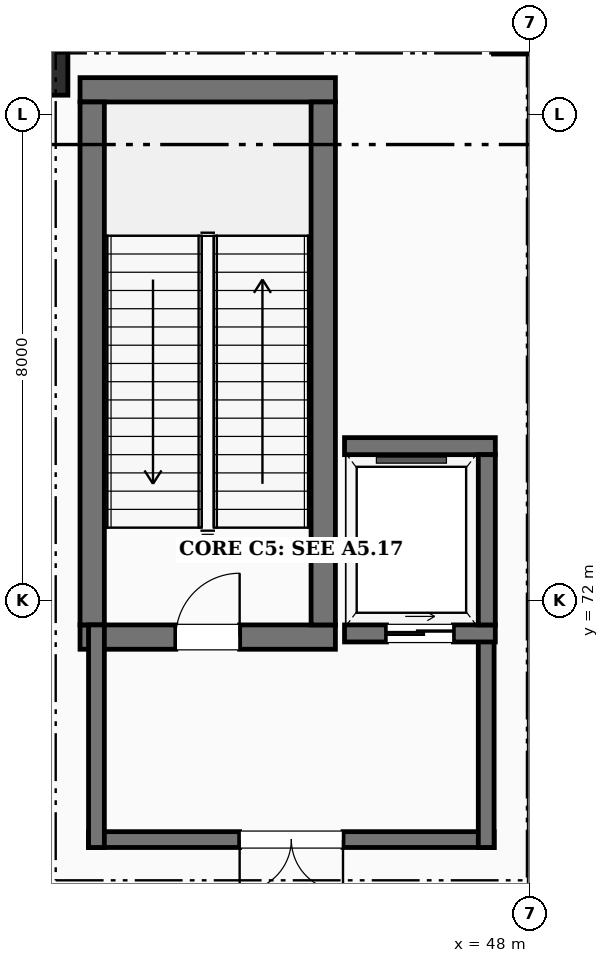
"""IFC4 building model, lengths in metres.
Left out: names, types, materials, properties, quantities, classifications, styles, units other than length and angle.
Written with IfcOpenShell. Run it as: python <this file> out.ifc"""

import sys

from ifc_helpers import new_model, si_unit, direction, frame, frame_2d, origin, origin_2d, place, context, subcontext, project, spatial, rectangle, extrude, element, fill, save


model = new_model("IFC4")
c1 = context("Model", 3, precision=1e-05, world=origin(), true_north=direction((0.0, 1.0)))
c2 = subcontext(c1, "Body", "Model", "MODEL_VIEW")
j1 = project(units=[si_unit("LENGTHUNIT", "METRE"), si_unit("PLANEANGLEUNIT", "RADIAN")], contexts=[c1])
p1 = place(None, origin())
s1 = spatial("IfcSite", under=j1, at=p1, CompositionType="ELEMENT")
p2 = place(p1, origin())
s2 = spatial("IfcBuilding", under=s1, at=p2, CompositionType="ELEMENT")
p3 = place(p2, origin())
s3 = spatial("IfcBuildingStorey", under=s2, at=p3, CompositionType="ELEMENT", Elevation=0.0)
p4 = place(p3, frame((40.0, 80.712, 0.0), z_axis=(0.0, 0.0, 1.0), x_axis=(1.0, 0.0, 0.0)))
e1 = element("IfcColumn", 1, at=p4, inside=s3, PredefinedType="COLUMN", context=c2, shape_type="SweptSolid", body=[
    extrude(rectangle(XDim=0.8, YDim=0.8, at=origin_2d()), origin(), (0.0, 0.0, 1.0), 5.4),
])
p5 = place(p3, frame((48.0, 81.388, 0.0), z_axis=(0.0, 0.0, 1.0), x_axis=(1.0, 0.0, 0.0)))
e2 = element("IfcColumn", 2, at=p5, inside=s3, PredefinedType="COLUMN", context=c2, shape_type="SweptSolid", body=[
    extrude(rectangle(XDim=1.2, YDim=0.8, at=origin_2d()), origin(), (0.0, 0.0, 1.0), 5.4),
])
p6 = place(p3, frame((40.6, 71.4, 0.0), z_axis=(0.0, 0.0, 1.0), x_axis=(1.0, 0.0, 0.0)))
e3 = element("IfcWall", 3, at=p6, inside=s3, PredefinedType="SHEAR", context=c2, shape_type="SweptSolid", body=[
    extrude(rectangle(XDim=4.2, YDim=0.4, at=frame_2d((2.1, 0.0))), origin(), (0.0, 0.0, 1.0), 5.4),
])
p7 = place(p6, frame((1.575, 0.0, 0.0)))
e4 = element("IfcOpeningElement", 4, at=p7, cuts=e3, PredefinedType="OPENING", context=c2, shape_type="SweptSolid", body=[
    extrude(rectangle(XDim=1.05, YDim=2.15, at=frame_2d((0.525, 1.075))), frame((0.0, 0.21, 0.0), z_axis=(0.0, -1.0, 0.0), x_axis=(1.0, 0.0, 0.0)), (0.0, 0.0, 1.0), 0.42),
])
p8 = place(p3, frame((40.6, 80.4, 0.0), z_axis=(0.0, 0.0, 1.0), x_axis=(1.0, 0.0, 0.0)))
e5 = element("IfcWall", 5, at=p8, inside=s3, PredefinedType="SHEAR", context=c2, shape_type="SweptSolid", body=[
    extrude(rectangle(XDim=4.2, YDim=0.4, at=frame_2d((2.1, 0.0))), origin(), (0.0, 0.0, 1.0), 5.4),
])
for number, where, z_axis, x_axis in (
    (6, (40.8, 71.6, 0.0), (0.0, 0.0, 1.0), (0.0, 1.0, 0.0)),
    (7, (44.6, 71.6, 0.0), (0.0, 0.0, 1.0), (0.0, 1.0, 0.0)),
):
    element("IfcWall", number, at=place(p3, frame(where, z_axis=z_axis, x_axis=x_axis)), inside=s3, PredefinedType="SHEAR", context=c2, shape_type="SweptSolid", body=[
        extrude(rectangle(XDim=8.6, YDim=0.4, at=frame_2d((4.3, 0.0))), origin(), (0.0, 0.0, 1.0), 5.4),
    ])
p9 = place(p3, frame((47.41, 68.07, 0.0), z_axis=(0.0, 0.0, 1.0), x_axis=(-1.0, 0.0, 0.0)))
e8 = element("IfcWall", 8, at=p9, inside=s3, PredefinedType="SHEAR", context=c2, shape_type="SweptSolid", body=[
    extrude(rectangle(XDim=6.67, YDim=0.26, at=frame_2d((3.335, 0.0))), origin(), (0.0, 0.0, 1.0), 5.4),
])
p10 = place(p9, frame((2.485, 0.0, 0.0)))
e9 = element("IfcOpeningElement", 9, at=p10, cuts=e8, PredefinedType="OPENING", context=c2, shape_type="SweptSolid", body=[
    extrude(rectangle(XDim=1.7, YDim=2.2, at=frame_2d((0.85, 1.1))), frame((0.0, 0.14, 0.0), z_axis=(0.0, -1.0, 0.0), x_axis=(1.0, 0.0, 0.0)), (0.0, 0.0, 1.0), 0.28),
])
for number, where, z_axis, x_axis in (
    (10, (40.87, 67.94, 0.0), (0.0, 0.0, 1.0), (0.0, 1.0, 0.0)),
    (11, (47.28, 67.94, 0.0), (0.0, 0.0, 1.0), (0.0, 1.0, 0.0)),
):
    element("IfcWall", number, at=place(p3, frame(where, z_axis=z_axis, x_axis=x_axis)), inside=s3, PredefinedType="SHEAR", context=c2, shape_type="SweptSolid", body=[
        extrude(rectangle(XDim=3.66, YDim=0.26, at=frame_2d((1.83, 0.0))), origin(), (0.0, 0.0, 1.0), 5.4),
    ])
p11 = place(p3, frame((44.95, 71.46, 0.0), z_axis=(0.0, 0.0, 1.0), x_axis=(1.0, 0.0, 0.0)))
e12 = element("IfcWall", 12, at=p11, inside=s3, PredefinedType="SHEAR", context=c2, shape_type="SweptSolid", body=[
    extrude(rectangle(XDim=2.48, YDim=0.28, at=frame_2d((1.24, 0.0))), origin(), (0.0, 0.0, 1.0), 5.4),
])
p12 = place(p11, frame((0.69, 0.0, 0.0)))
e13 = element("IfcOpeningElement", 13, at=p12, cuts=e12, PredefinedType="OPENING", context=c2, shape_type="SweptSolid", body=[
    extrude(rectangle(XDim=1.1, YDim=2.15, at=frame_2d((0.55, 1.075))), frame((0.0, 0.15, 0.0), z_axis=(0.0, -1.0, 0.0), x_axis=(1.0, 0.0, 0.0)), (0.0, 0.0, 1.0), 0.3),
])
p13 = place(p3, frame((44.95, 74.54, 0.0), z_axis=(0.0, 0.0, 1.0), x_axis=(1.0, 0.0, 0.0)))
e14 = element("IfcWall", 14, at=p13, inside=s3, PredefinedType="SHEAR", context=c2, shape_type="SweptSolid", body=[
    extrude(rectangle(XDim=2.48, YDim=0.28, at=frame_2d((1.24, 0.0))), origin(), (0.0, 0.0, 1.0), 5.4),
])
p14 = place(p3, frame((47.29, 71.6, 0.0), z_axis=(0.0, 0.0, 1.0), x_axis=(0.0, 1.0, 0.0)))
e15 = element("IfcWall", 15, at=p14, inside=s3, PredefinedType="SHEAR", context=c2, shape_type="SweptSolid", body=[
    extrude(rectangle(XDim=2.8, YDim=0.28, at=frame_2d((1.4, 0.0))), origin(), (0.0, 0.0, 1.0), 5.4),
])
p15 = place(p7, origin())
e16 = element("IfcDoor", 16, at=p15, inside=s3, OperationType="SINGLE_SWING_RIGHT", PredefinedType="DOOR", context=c2, shape_type="SweptSolid", body=[
    extrude(rectangle(XDim=1.05, YDim=2.15, at=frame_2d((0.525, 1.075))), frame((0.0, 0.025, 0.0), z_axis=(0.0, -1.0, 0.0), x_axis=(1.0, 0.0, 0.0)), (0.0, 0.0, 1.0), 0.05),
])
fill(e4, e16)
p16 = place(p10, origin())
e17 = element("IfcDoor", 17, at=p16, inside=s3, OperationType="DOUBLE_DOOR_SINGLE_SWING", PredefinedType="DOOR", context=c2, shape_type="SweptSolid", body=[
    extrude(rectangle(XDim=1.7, YDim=2.2, at=frame_2d((0.85, 1.1))), frame((0.0, 0.025, 0.0), z_axis=(0.0, -1.0, 0.0), x_axis=(1.0, 0.0, 0.0)), (0.0, 0.0, 1.0), 0.05),
])
fill(e9, e17)
p17 = place(p12, origin())
e18 = element("IfcDoor", 18, at=p17, inside=s3, OperationType="SLIDING_TO_LEFT", PredefinedType="DOOR", context=c2, shape_type="SweptSolid", body=[
    extrude(rectangle(XDim=1.1, YDim=2.15, at=frame_2d((0.55, 1.075))), frame((0.0, 0.025, 0.0), z_axis=(0.0, -1.0, 0.0), x_axis=(1.0, 0.0, 0.0)), (0.0, 0.0, 1.0), 0.05),
])
fill(e13, e18)
save(model, sys.argv[1])
